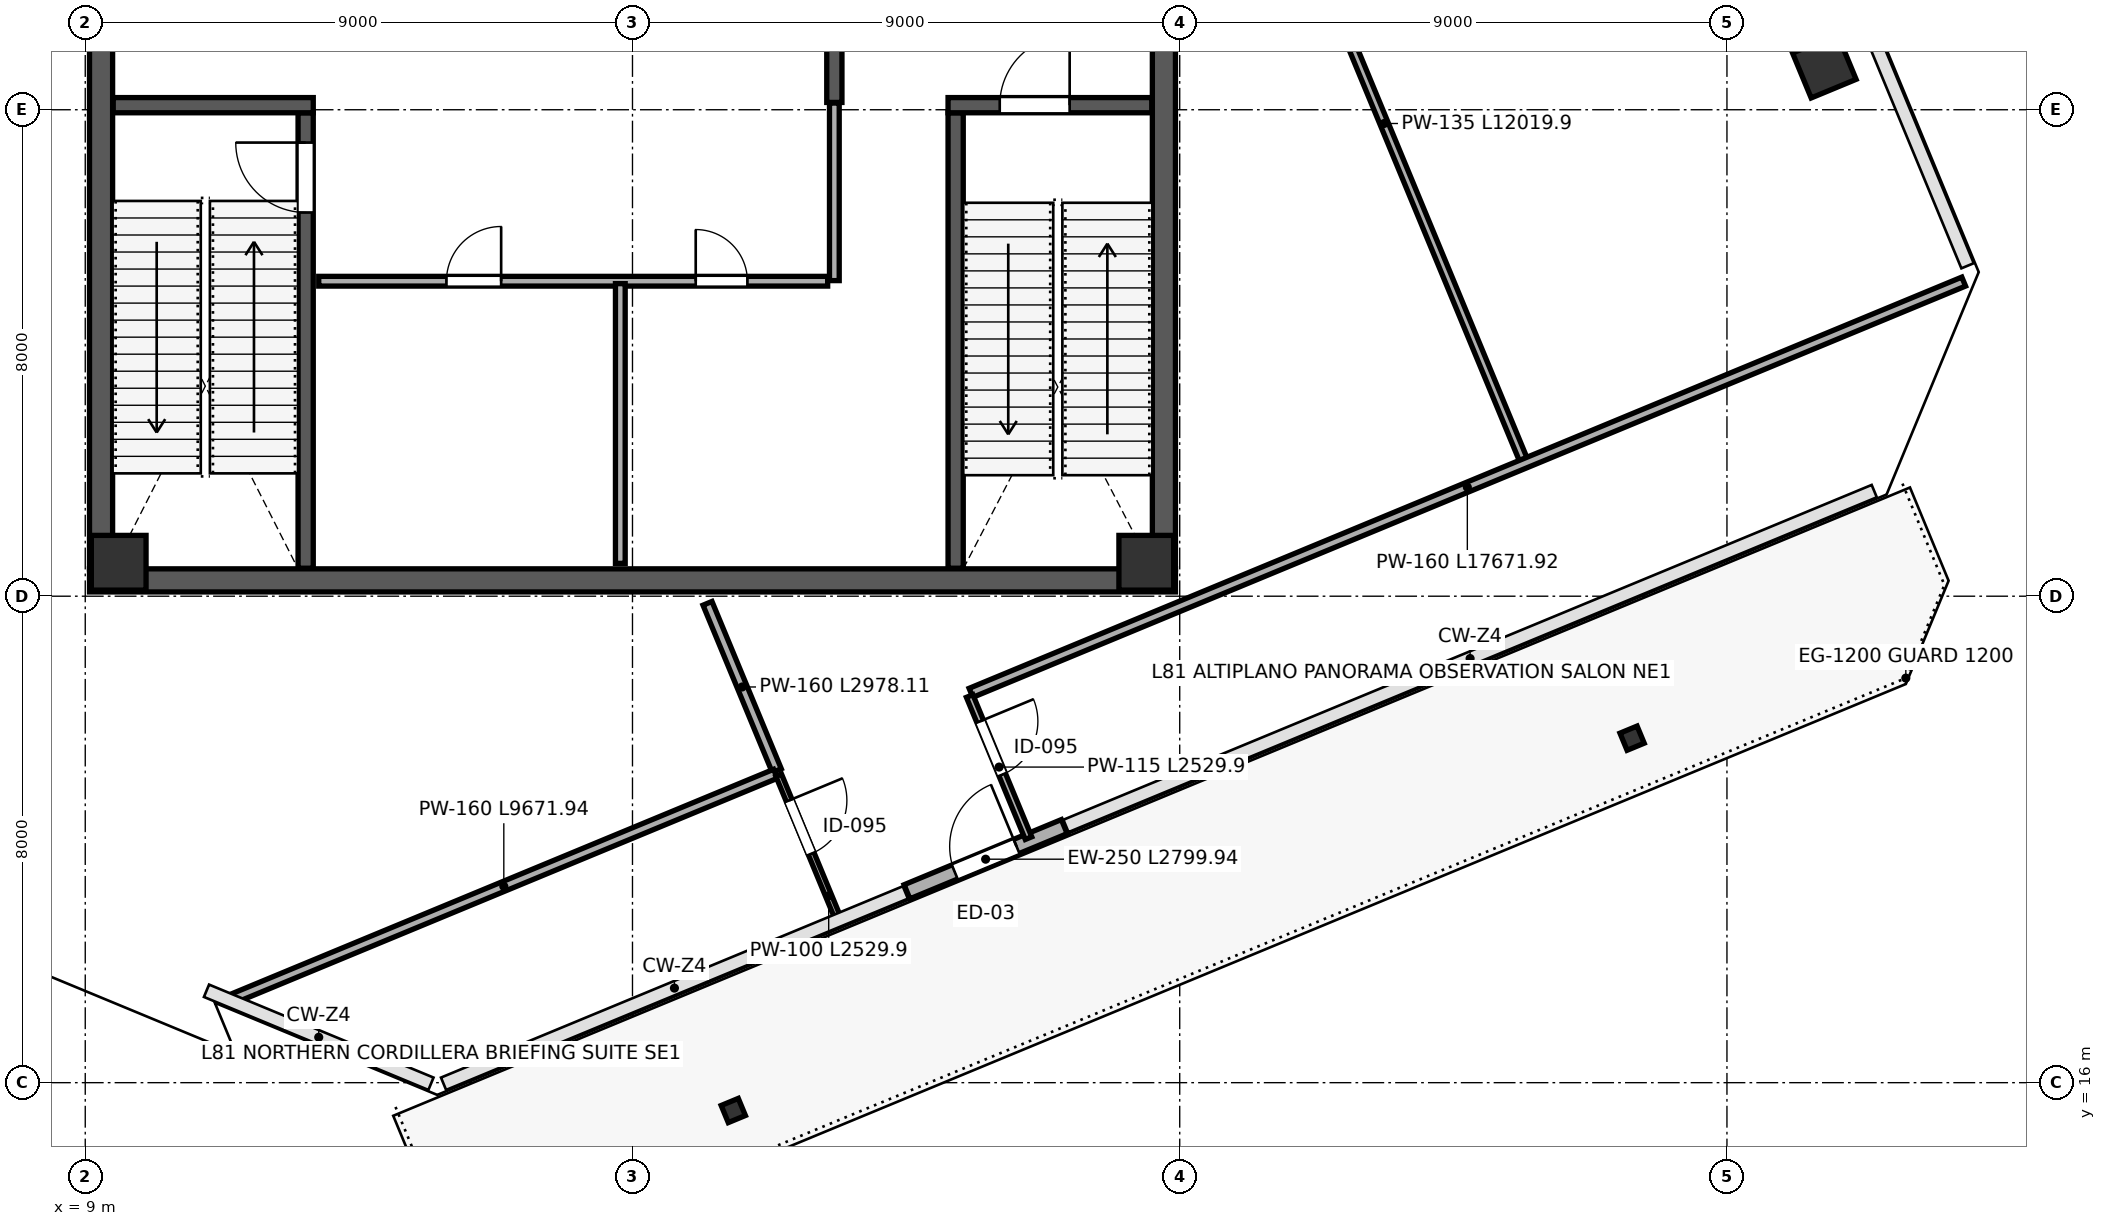
"""IFC4 building model, lengths in metres.
Left out: names, types, materials, properties, quantities, classifications, styles, units other than length and angle.
Written with IfcOpenShell. Run it as: python <this file> out.ifc"""

import sys

from ifc_helpers import new_model, si_unit, direction, frame, frame_2d, origin, origin_2d, place, context, subcontext, project, spatial, rectangle, hollow_rectangle, extrude, source, transform, mapped, element, fill, save


model = new_model("IFC4")
c1 = context("Model", 3, precision=1e-05, world=origin(), true_north=direction((0.0, 1.0)))
c2 = subcontext(c1, "Body", "Model", "MODEL_VIEW")
j1 = project(units=[si_unit("LENGTHUNIT", "METRE"), si_unit("PLANEANGLEUNIT", "RADIAN")], contexts=[c1])
p1 = place(None, origin())
s1 = spatial("IfcSite", under=j1, at=p1, CompositionType="ELEMENT")
p2 = place(p1, origin())
s2 = spatial("IfcBuilding", under=s1, at=p2, CompositionType="ELEMENT")
p3 = place(p2, frame((0.0, 0.0, 360.0)))
s3 = spatial("IfcBuildingStorey", under=s2, at=p3, CompositionType="ELEMENT", Elevation=360.0)
m1 = source(origin(), c2, "Body", "SweptSolid", [
    extrude(rectangle(XDim=0.9, YDim=0.9, at=origin_2d()), origin(), (0.0, 0.0, 1.0), 5.999),
])
for number, where, z_axis, x_axis in (
    (1, (9.55, 24.55, 0.001), (0.0, 0.0, 1.0), (1.0, 0.0, 0.0)),
    (2, (26.45, 24.55, 0.001), (0.0, 0.0, 1.0), (1.0, 0.0, 0.0)),
):
    element("IfcColumn", number, at=place(p3, frame(where, z_axis=z_axis, x_axis=x_axis)), inside=s3, PredefinedType="COLUMN", context=c2, shape_type="MappedRepresentation", body=[
        mapped(m1, transform((0.0, 0.0, 0.0), scale=1.0)),
    ])
m2 = source(origin(), c2, "Body", "SweptSolid", [
    extrude(rectangle(XDim=0.8, YDim=0.8, at=origin_2d()), origin(), (0.0, 0.0, 1.0), 5.699),
])
p4 = place(p3, frame((37.602, 32.716, 0.001), z_axis=(0.0, 0.0, 1.0), x_axis=(-0.382683432365, 0.923879532511, 0.0)))
e3 = element("IfcColumn", 3, at=p4, inside=s3, PredefinedType="COLUMN", context=c2, shape_type="MappedRepresentation", body=[
    mapped(m2, transform((0.0, 0.0, 0.0), scale=1.0)),
])
m3 = source(origin(), c2, "Body", "SweptSolid", [
    extrude(hollow_rectangle(XDim=0.305, YDim=0.305, WallThickness=0.016, InnerFilletRadius=0.016, OuterFilletRadius=0.032, at=origin_2d()), origin(), (0.0, 0.0, 1.0), 5.699),
])
for number, where, z_axis, x_axis in (
    (4, (19.658, 15.542, 0.001), (0.0, 0.0, 1.0), (-0.383, 0.924, 0.0)),
    (5, (34.44, 21.665, 0.001), (0.0, 0.0, 1.0), (-0.383, 0.924, 0.0)),
):
    element("IfcColumn", number, at=place(p3, frame(where, z_axis=z_axis, x_axis=x_axis)), inside=s3, PredefinedType="USERDEFINED", context=c2, shape_type="MappedRepresentation", body=[
        mapped(m3, transform((0.0, 0.0, 0.0), scale=1.0)),
    ])
p5 = place(p3, frame((22.515, 19.139, 0.0), z_axis=(0.0, 0.0, 1.0), x_axis=(0.92391057023, 0.382608492088, 0.0)))
e6 = element("IfcWall", 6, at=p5, inside=s3, PredefinedType="SOLIDWALL", context=c2, shape_type="SweptSolid", body=[
    extrude(rectangle(XDim=2.8, YDim=0.25, at=frame_2d((1.4, 0.0))), origin(), (0.0, 0.0, 1.0), 5.72),
])
p6 = place(p5, frame((0.85, 0.0, 0.0)))
e7 = element("IfcOpeningElement", 7, at=p6, cuts=e6, PredefinedType="OPENING", context=c2, shape_type="SweptSolid", body=[
    extrude(rectangle(XDim=1.1, YDim=2.2, at=frame_2d((0.55, 1.1))), frame((0.0, 0.135, 0.0), z_axis=(0.0, -1.0, 0.0), x_axis=(1.0, 0.0, 0.0)), (0.0, 0.0, 1.0), 0.27),
])
p7 = place(p3, frame((9.26, 24.45, 0.0), z_axis=(0.0, 0.0, 1.0), x_axis=(0.0, 1.0, 0.0)))
e8 = element("IfcWall", 8, at=p7, inside=s3, PredefinedType="SHEAR", context=c2, shape_type="SweptSolid", body=[
    extrude(rectangle(XDim=15.1, YDim=0.38, at=frame_2d((7.55, 0.0))), origin(), (0.0, 0.0, 1.0), 5.72),
])
p8 = place(p7, frame((8.7, 0.0, 0.0)))
e9 = element("IfcOpeningElement", 9, at=p8, cuts=e8, PredefinedType="OPENING", context=c2, shape_type="SweptSolid", body=[
    extrude(rectangle(XDim=1.15, YDim=2.2, at=frame_2d((0.575, 1.1))), frame((0.0, 0.2, 0.0), z_axis=(0.0, -1.0, 0.0), x_axis=(1.0, 0.0, 0.0)), (0.0, 0.0, 1.0), 0.4),
])
p9 = place(p3, frame((26.74, 24.45, 0.0), z_axis=(0.0, 0.0, 1.0), x_axis=(0.0, 1.0, 0.0)))
e10 = element("IfcWall", 10, at=p9, inside=s3, PredefinedType="SHEAR", context=c2, shape_type="SweptSolid", body=[
    extrude(rectangle(XDim=15.1, YDim=0.38, at=frame_2d((7.55, 0.0))), origin(), (0.0, 0.0, 1.0), 5.72),
])
p10 = place(p9, frame((8.6, 0.0, 0.0)))
e11 = element("IfcOpeningElement", 11, at=p10, cuts=e10, PredefinedType="OPENING", context=c2, shape_type="SweptSolid", body=[
    extrude(rectangle(XDim=1.15, YDim=2.2, at=frame_2d((0.575, 1.1))), frame((0.0, 0.2, 0.0), z_axis=(0.0, -1.0, 0.0), x_axis=(1.0, 0.0, 0.0)), (0.0, 0.0, 1.0), 0.4),
])
p11 = place(p3, frame((9.07, 24.26, 0.0), z_axis=(0.0, 0.0, 1.0), x_axis=(1.0, 0.0, 0.0)))
e12 = element("IfcWall", 12, at=p11, inside=s3, PredefinedType="SHEAR", context=c2, shape_type="SweptSolid", body=[
    extrude(rectangle(XDim=17.86, YDim=0.38, at=frame_2d((8.93, 0.0))), origin(), (0.0, 0.0, 1.0), 5.72),
])
p12 = place(p3, frame((12.625, 24.46, 0.0), z_axis=(0.0, 0.0, 1.0), x_axis=(0.0, 1.0, 0.0)))
e13 = element("IfcWall", 13, at=p12, inside=s3, PredefinedType="SHEAR", context=c2, shape_type="SweptSolid", body=[
    extrude(rectangle(XDim=7.49, YDim=0.25, at=frame_2d((3.745, 0.0))), origin(), (0.0, 0.0, 1.0), 5.72),
])
p13 = place(p12, frame((5.85, 0.0, 0.0)))
e14 = element("IfcOpeningElement", 14, at=p13, cuts=e13, PredefinedType="OPENING", context=c2, shape_type="SweptSolid", body=[
    extrude(rectangle(XDim=1.15, YDim=2.2, at=frame_2d((0.575, 1.1))), frame((0.0, 0.135, 0.0), z_axis=(0.0, -1.0, 0.0), x_axis=(1.0, 0.0, 0.0)), (0.0, 0.0, 1.0), 0.27),
])
p14 = place(p3, frame((9.46, 32.075, 0.0), z_axis=(0.0, 0.0, 1.0), x_axis=(1.0, 0.0, 0.0)))
e15 = element("IfcWall", 15, at=p14, inside=s3, PredefinedType="SHEAR", context=c2, shape_type="SweptSolid", body=[
    extrude(rectangle(XDim=3.29, YDim=0.25, at=frame_2d((1.645, 0.0))), origin(), (0.0, 0.0, 1.0), 5.72),
])
p15 = place(p3, frame((23.315, 24.46, 0.0), z_axis=(0.0, 0.0, 1.0), x_axis=(0.0, 1.0, 0.0)))
e16 = element("IfcWall", 16, at=p15, inside=s3, PredefinedType="SHEAR", context=c2, shape_type="SweptSolid", body=[
    extrude(rectangle(XDim=7.49, YDim=0.25, at=frame_2d((3.745, 0.0))), origin(), (0.0, 0.0, 1.0), 5.72),
])
p16 = place(p3, frame((23.19, 32.075, 0.0), z_axis=(0.0, 0.0, 1.0), x_axis=(1.0, 0.0, 0.0)))
e17 = element("IfcWall", 17, at=p16, inside=s3, PredefinedType="SHEAR", context=c2, shape_type="SweptSolid", body=[
    extrude(rectangle(XDim=3.35, YDim=0.25, at=frame_2d((1.675, 0.0))), origin(), (0.0, 0.0, 1.0), 5.72),
])
p17 = place(p16, frame((0.85, 0.0, 0.0)))
e18 = element("IfcOpeningElement", 18, at=p17, cuts=e17, PredefinedType="OPENING", context=c2, shape_type="SweptSolid", body=[
    extrude(rectangle(XDim=1.15, YDim=2.2, at=frame_2d((0.575, 1.1))), frame((0.0, 0.135, 0.0), z_axis=(0.0, -1.0, 0.0), x_axis=(1.0, 0.0, 0.0)), (0.0, 0.0, 1.0), 0.27),
])
p18 = place(p3, frame((21.32, 32.12, 0.0), z_axis=(0.0, 0.0, 1.0), x_axis=(0.0, 1.0, 0.0)))
e19 = element("IfcWall", 19, at=p18, inside=s3, PredefinedType="SHEAR", context=c2, shape_type="SweptSolid", body=[
    extrude(rectangle(XDim=7.42, YDim=0.25, at=frame_2d((3.71, 0.0))), origin(), (0.0, 0.0, 1.0), 5.72),
])
p19 = place(p18, frame((1.4, 0.0, 0.0)))
e20 = element("IfcOpeningElement", 20, at=p19, cuts=e19, PredefinedType="OPENING", context=c2, shape_type="SweptSolid", body=[
    extrude(rectangle(XDim=1.15, YDim=2.2, at=frame_2d((0.575, 1.1))), frame((0.0, 0.135, 0.0), z_axis=(0.0, -1.0, 0.0), x_axis=(1.0, 0.0, 0.0)), (0.0, 0.0, 1.0), 0.27),
])
p20 = place(p3, frame((12.84, 29.18, 0.0), z_axis=(0.0, 0.0, 1.0), x_axis=(1.0, 0.0, 0.0)))
e21 = element("IfcWall", 21, at=p20, inside=s3, PredefinedType="PARTITIONING", context=c2, shape_type="SweptSolid", body=[
    extrude(rectangle(XDim=8.37, YDim=0.16, at=frame_2d((4.185, 0.0))), origin(), (0.0, 0.0, 1.0), 5.72),
])
p21 = place(p20, frame((2.1, 0.0, 0.0)))
e22 = element("IfcOpeningElement", 22, at=p21, cuts=e21, PredefinedType="OPENING", context=c2, shape_type="SweptSolid", body=[
    extrude(rectangle(XDim=0.9, YDim=2.15, at=frame_2d((0.45, 1.075))), frame((0.0, 0.09, 0.0), z_axis=(0.0, -1.0, 0.0), x_axis=(1.0, 0.0, 0.0)), (0.0, 0.0, 1.0), 0.18),
])
p22 = place(p20, frame((6.2, 0.0, 0.0)))
e23 = element("IfcOpeningElement", 23, at=p22, cuts=e21, PredefinedType="OPENING", context=c2, shape_type="SweptSolid", body=[
    extrude(rectangle(XDim=0.85, YDim=2.1, at=frame_2d((0.425, 1.05))), frame((0.0, 0.09, 0.0), z_axis=(0.0, -1.0, 0.0), x_axis=(1.0, 0.0, 0.0)), (0.0, 0.0, 1.0), 0.18),
])
p23 = place(p3, frame((17.8, 24.54, 0.0), z_axis=(0.0, 0.0, 1.0), x_axis=(0.0, 1.0, 0.0)))
e24 = element("IfcWall", 24, at=p23, inside=s3, PredefinedType="PARTITIONING", context=c2, shape_type="SweptSolid", body=[
    extrude(rectangle(XDim=4.6, YDim=0.16, at=frame_2d((2.3, 0.0))), origin(), (0.0, 0.0, 1.0), 5.72),
])
p24 = place(p3, frame((21.32, 29.19, 0.0), z_axis=(0.0, 0.0, 1.0), x_axis=(0.0, 1.0, 0.0)))
e25 = element("IfcWall", 25, at=p24, inside=s3, PredefinedType="PARTITIONING", context=c2, shape_type="SweptSolid", body=[
    extrude(rectangle(XDim=2.92, YDim=0.16, at=frame_2d((1.46, 0.0))), origin(), (0.0, 0.0, 1.0), 5.72),
])
p25 = place(p3, frame((19.234, 23.883, 0.0), z_axis=(0.0, 0.0, 1.0), x_axis=(0.382670358191, -0.923884947903, 0.0)))
e26 = element("IfcWall", 26, at=p25, inside=s3, PredefinedType="PARTITIONING", context=c2, shape_type="SweptSolid", body=[
    extrude(rectangle(XDim=2.978, YDim=0.16, at=frame_2d((1.489, 0.0))), origin(), (0.0, 0.0, 1.0), 5.72),
])
p26 = place(p3, frame((28.061, 37.326, 0.0), z_axis=(0.0, 0.0, 1.0), x_axis=(0.382684852278, -0.923878944363, 0.0)))
e27 = element("IfcWall", 27, at=p26, inside=s3, PredefinedType="PARTITIONING", context=c2, shape_type="SweptSolid", body=[
    extrude(rectangle(XDim=12.02, YDim=0.135, at=frame_2d((6.01, 0.0))), origin(), (0.0, 0.0, 1.0), 5.72),
])
p27 = place(p3, frame((23.567, 22.411, 0.0), z_axis=(0.0, 0.0, 1.0), x_axis=(0.923875223291, 0.382693835577, 0.0)))
e28 = element("IfcWall", 28, at=p27, inside=s3, PredefinedType="PARTITIONING", context=c2, shape_type="SweptSolid", body=[
    extrude(rectangle(XDim=17.672, YDim=0.16, at=frame_2d((8.836, 0.0))), origin(), (0.0, 0.0, 1.0), 5.72),
])
p28 = place(p3, frame((11.416, 17.378, 0.0), z_axis=(0.0, 0.0, 1.0), x_axis=(0.923876235796, 0.382691391243, 0.0)))
e29 = element("IfcWall", 29, at=p28, inside=s3, PredefinedType="PARTITIONING", context=c2, shape_type="SweptSolid", body=[
    extrude(rectangle(XDim=9.672, YDim=0.16, at=frame_2d((4.836, 0.0))), origin(), (0.0, 0.0, 1.0), 5.72),
])
p29 = place(p3, frame((23.545, 22.359, 0.0), z_axis=(0.0, 0.0, 1.0), x_axis=(0.382743857879, -0.923854501129, 0.0)))
e30 = element("IfcWall", 30, at=p29, inside=s3, PredefinedType="PARTITIONING", context=c2, shape_type="SweptSolid", body=[
    extrude(rectangle(XDim=2.53, YDim=0.115, at=frame_2d((1.265, 0.0))), origin(), (0.0, 0.0, 1.0), 5.72),
])
p30 = place(p29, frame((0.45, 0.0, 0.0)))
e31 = element("IfcOpeningElement", 31, at=p30, cuts=e30, PredefinedType="OPENING", context=c2, shape_type="SweptSolid", body=[
    extrude(rectangle(XDim=0.95, YDim=2.15, at=frame_2d((0.475, 1.075))), frame((0.0, 0.067, 0.0), z_axis=(0.0, -1.0, 0.0), x_axis=(1.0, 0.0, 0.0)), (0.0, 0.0, 1.0), 0.135),
])
p31 = place(p3, frame((20.404, 21.058, 0.0), z_axis=(0.0, 0.0, 1.0), x_axis=(0.382709736079, -0.923868636717, 0.0)))
e32 = element("IfcWall", 32, at=p31, inside=s3, PredefinedType="PARTITIONING", context=c2, shape_type="SweptSolid", body=[
    extrude(rectangle(XDim=2.53, YDim=0.1, at=frame_2d((1.265, 0.0))), origin(), (0.0, 0.0, 1.0), 5.72),
])
p32 = place(p31, frame((0.45, 0.0, 0.0)))
e33 = element("IfcOpeningElement", 33, at=p32, cuts=e32, PredefinedType="OPENING", context=c2, shape_type="SweptSolid", body=[
    extrude(rectangle(XDim=0.95, YDim=2.15, at=frame_2d((0.475, 1.075))), frame((0.0, 0.06, 0.0), z_axis=(0.0, -1.0, 0.0), x_axis=(1.0, 0.0, 0.0)), (0.0, 0.0, 1.0), 0.12),
])
m4 = source(origin(), c2, "Body", "SweptSolid", [
    extrude(rectangle(XDim=1.1, YDim=2.2, at=frame_2d((0.55, 1.1))), frame((0.0, 0.025, 0.0), z_axis=(0.0, -1.0, 0.0), x_axis=(1.0, 0.0, 0.0)), (0.0, 0.0, 1.0), 0.05),
])
p33 = place(p6, origin())
e34 = element("IfcDoor", 34, at=p33, inside=s3, OperationType="SINGLE_SWING_RIGHT", PredefinedType="DOOR", context=c2, shape_type="MappedRepresentation", body=[
    mapped(m4, transform((0.0, 0.0, 0.0), scale=1.0)),
])
fill(e7, e34)
m5 = source(origin(), c2, "Body", "SweptSolid", [
    extrude(rectangle(XDim=1.15, YDim=2.2, at=frame_2d((0.575, 1.1))), frame((0.0, 0.025, 0.0), z_axis=(0.0, -1.0, 0.0), x_axis=(1.0, 0.0, 0.0)), (0.0, 0.0, 1.0), 0.05),
])
p34 = place(p13, origin())
e35 = element("IfcDoor", 35, at=p34, inside=s3, OperationType="SINGLE_SWING_RIGHT", PredefinedType="DOOR", context=c2, shape_type="MappedRepresentation", body=[
    mapped(m5, transform((0.0, 0.0, 0.0), scale=1.0)),
])
fill(e14, e35)
p35 = place(p17, origin())
e36 = element("IfcDoor", 36, at=p35, inside=s3, OperationType="SINGLE_SWING_RIGHT", PredefinedType="DOOR", context=c2, shape_type="MappedRepresentation", body=[
    mapped(m5, transform((0.0, 0.0, 0.0), scale=1.0)),
])
fill(e18, e36)
m6 = source(origin(), c2, "Body", "SweptSolid", [
    extrude(rectangle(XDim=0.9, YDim=2.15, at=frame_2d((0.45, 1.075))), frame((0.0, 0.025, 0.0), z_axis=(0.0, -1.0, 0.0), x_axis=(1.0, 0.0, 0.0)), (0.0, 0.0, 1.0), 0.05),
])
p36 = place(p21, origin())
e37 = element("IfcDoor", 37, at=p36, inside=s3, OperationType="SINGLE_SWING_RIGHT", PredefinedType="DOOR", context=c2, shape_type="MappedRepresentation", body=[
    mapped(m6, transform((0.0, 0.0, 0.0), scale=1.0)),
])
fill(e22, e37)
m7 = source(origin(), c2, "Body", "SweptSolid", [
    extrude(rectangle(XDim=0.85, YDim=2.1, at=frame_2d((0.425, 1.05))), frame((0.0, 0.025, 0.0), z_axis=(0.0, -1.0, 0.0), x_axis=(1.0, 0.0, 0.0)), (0.0, 0.0, 1.0), 0.05),
])
p37 = place(p22, origin())
e38 = element("IfcDoor", 38, at=p37, inside=s3, OperationType="SINGLE_SWING_LEFT", PredefinedType="DOOR", context=c2, shape_type="MappedRepresentation", body=[
    mapped(m7, transform((0.0, 0.0, 0.0), scale=1.0)),
])
fill(e23, e38)
m8 = source(origin(), c2, "Body", "SweptSolid", [
    extrude(rectangle(XDim=0.95, YDim=2.15, at=frame_2d((0.475, 1.075))), frame((0.0, 0.025, 0.0), z_axis=(0.0, -1.0, 0.0), x_axis=(1.0, 0.0, 0.0)), (0.0, 0.0, 1.0), 0.05),
])
p38 = place(p30, origin())
e39 = element("IfcDoor", 39, at=p38, inside=s3, OperationType="SINGLE_SWING_LEFT", PredefinedType="DOOR", context=c2, shape_type="MappedRepresentation", body=[
    mapped(m8, transform((0.0, 0.0, 0.0), scale=1.0)),
])
fill(e31, e39)
p39 = place(p32, origin())
e40 = element("IfcDoor", 40, at=p39, inside=s3, OperationType="SINGLE_SWING_LEFT", PredefinedType="DOOR", context=c2, shape_type="MappedRepresentation", body=[
    mapped(m8, transform((0.0, 0.0, 0.0), scale=1.0)),
])
fill(e33, e40)
save(model, sys.argv[1])
